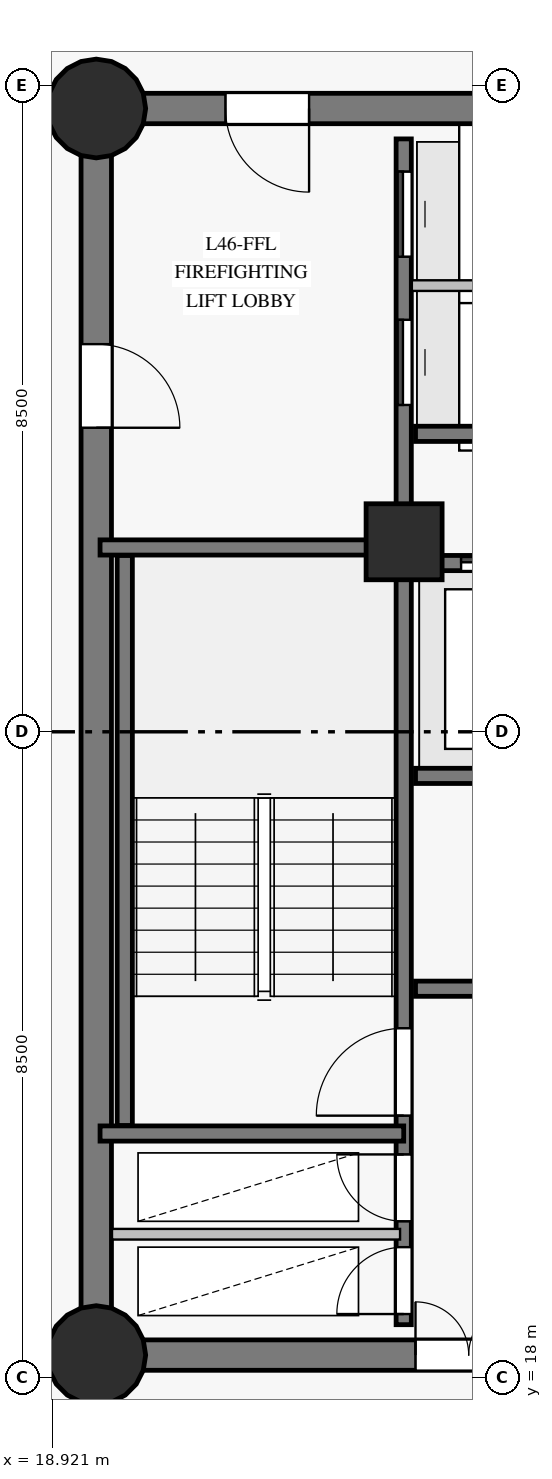
"""IFC4 building model, lengths in metres.
Left out: names, types, materials, properties, quantities, classifications, styles, units other than length and angle.
Written with IfcOpenShell. Run it as: python <this file> out.ifc"""

import sys

from ifc_helpers import new_model, si_unit, direction, frame, frame_2d, origin, origin_with_axes, origin_2d, place, context, subcontext, project, spatial, rectangle, circle, extrude, source, transform, mapped, element, fill, save


model = new_model("IFC4")
c1 = context("Model", 3, precision=1e-05, world=origin(), true_north=direction((0.0, 1.0)))
c2 = subcontext(c1, "Body", "Model", "MODEL_VIEW")
j1 = project(units=[si_unit("LENGTHUNIT", "METRE"), si_unit("PLANEANGLEUNIT", "RADIAN")], contexts=[c1])
p1 = place(None, origin())
s1 = spatial("IfcSite", under=j1, at=p1, CompositionType="ELEMENT")
p2 = place(p1, origin())
s2 = spatial("IfcBuilding", under=s1, at=p2, CompositionType="ELEMENT")
p3 = place(p2, frame((0.0, 0.0, 162.65)))
s3 = spatial("IfcBuildingStorey", under=s2, at=p3, CompositionType="ELEMENT", Elevation=162.65)
p4 = place(p3, frame((19.5, 18.3, 0.0), z_axis=(0.0, 0.0, 1.0), x_axis=(1.0, 0.0, 0.0)))
e1 = element("IfcWall", 1, at=p4, inside=s3, PredefinedType="SHEAR", context=c2, shape_type="SweptSolid", body=[
    extrude(rectangle(XDim=7.05, YDim=0.4, at=frame_2d((3.525, 0.0))), origin(), (0.0, 0.0, 1.0), 2.825),
])
p5 = place(p4, frame((4.2, 0.0, 0.0)))
e2 = element("IfcOpeningElement", 2, at=p5, cuts=e1, PredefinedType="OPENING", context=c2, shape_type="SweptSolid", body=[
    extrude(rectangle(XDim=1.4, YDim=2.2, at=frame_2d((0.7, 1.1))), frame((0.0, 0.21, 0.0), z_axis=(0.0, -1.0, 0.0), x_axis=(1.0, 0.0, 0.0)), (0.0, 0.0, 1.0), 0.42),
])
p6 = place(p3, frame((26.55, 34.7, 0.0), z_axis=(0.0, 0.0, 1.0), x_axis=(-1.0, 0.0, 0.0)))
e3 = element("IfcWall", 3, at=p6, inside=s3, PredefinedType="SHEAR", context=c2, shape_type="SweptSolid", body=[
    extrude(rectangle(XDim=7.05, YDim=0.4, at=frame_2d((3.525, 0.0))), origin(), (0.0, 0.0, 1.0), 2.825),
])
p7 = place(p6, frame((4.25, 0.0, 0.0)))
e4 = element("IfcOpeningElement", 4, at=p7, cuts=e3, PredefinedType="OPENING", context=c2, shape_type="SweptSolid", body=[
    extrude(rectangle(XDim=1.1, YDim=2.15, at=frame_2d((0.55, 1.075))), frame((0.0, 0.21, 0.0), z_axis=(0.0, -1.0, 0.0), x_axis=(1.0, 0.0, 0.0)), (0.0, 0.0, 1.0), 0.42),
])
p8 = place(p3, frame((19.5, 34.7, 0.0), z_axis=(0.0, 0.0, 1.0), x_axis=(0.0, -1.0, 0.0)))
e5 = element("IfcWall", 5, at=p8, inside=s3, PredefinedType="SHEAR", context=c2, shape_type="SweptSolid", body=[
    extrude(rectangle(XDim=16.4, YDim=0.4, at=frame_2d((8.2, 0.0))), origin(), (0.0, 0.0, 1.0), 2.825),
])
p9 = place(p8, frame((3.1, 0.0, 0.0)))
e6 = element("IfcOpeningElement", 6, at=p9, cuts=e5, PredefinedType="OPENING", context=c2, shape_type="SweptSolid", body=[
    extrude(rectangle(XDim=1.1, YDim=2.15, at=frame_2d((0.55, 1.075))), frame((0.0, 0.21, 0.0), z_axis=(0.0, -1.0, 0.0), x_axis=(1.0, 0.0, 0.0)), (0.0, 0.0, 1.0), 0.42),
])
m1 = source(origin_with_axes(), c2, "Body", "SweptSolid", [
    extrude(circle(Radius=0.65, at=origin_2d()), origin(), (0.0, 0.0, 1.0), 3.05),
])
for number, where, z_axis, x_axis in (
    (7, (19.5, 18.3, 0.0), (0.0, 0.0, 1.0), (1.0, 0.0, 0.0)),
    (8, (19.5, 34.7, 0.0), (0.0, 0.0, 1.0), (1.0, 0.0, 0.0)),
):
    element("IfcColumn", number, at=place(p3, frame(where, z_axis=z_axis, x_axis=x_axis)), inside=s3, PredefinedType="COLUMN", context=c2, shape_type="MappedRepresentation", body=[
        mapped(m1, transform((0.0, 0.0, 0.0), scale=1.0)),
    ])
m2 = source(origin_with_axes(), c2, "Body", "SweptSolid", [
    extrude(rectangle(XDim=1.0, YDim=1.0, at=origin_2d()), origin(), (0.0, 0.0, 1.0), 3.05),
])
p10 = place(p3, frame((23.55, 29.0, 0.0), z_axis=(0.0, 0.0, 1.0), x_axis=(1.0, 0.0, 0.0)))
e9 = element("IfcColumn", 9, at=p10, inside=s3, PredefinedType="COLUMN", context=c2, shape_type="MappedRepresentation", body=[
    mapped(m2, transform((0.0, 0.0, 0.0), scale=1.0)),
])
p11 = place(p3, frame((23.545, 18.7, 0.0), z_axis=(0.0, 0.0, 1.0), x_axis=(0.0, 1.0, 0.0)))
e10 = element("IfcWall", 10, at=p11, inside=s3, PredefinedType="SHEAR", context=c2, shape_type="SweptSolid", body=[
    extrude(rectangle(XDim=15.6, YDim=0.2, at=frame_2d((7.8, 0.0))), origin(), (0.0, 0.0, 1.0), 2.825),
])
p12 = place(p11, frame((2.75, 0.0, 0.0)))
e11 = element("IfcOpeningElement", 11, at=p12, cuts=e10, PredefinedType="OPENING", context=c2, shape_type="SweptSolid", body=[
    extrude(rectangle(XDim=1.15, YDim=2.15, at=frame_2d((0.575, 1.075))), frame((0.0, 0.11, 0.0), z_axis=(0.0, -1.0, 0.0), x_axis=(1.0, 0.0, 0.0)), (0.0, 0.0, 1.0), 0.22),
])
p13 = place(p11, frame((0.14, 0.0, 0.0)))
e12 = element("IfcOpeningElement", 12, at=p13, cuts=e10, PredefinedType="OPENING", context=c2, shape_type="SweptSolid", body=[
    extrude(rectangle(XDim=0.88, YDim=2.1, at=frame_2d((0.44, 1.05))), frame((0.0, 0.11, 0.0), z_axis=(0.0, -1.0, 0.0), x_axis=(1.0, 0.0, 0.0)), (0.0, 0.0, 1.0), 0.22),
])
p14 = place(p11, frame((1.36, 0.0, 0.0)))
e13 = element("IfcOpeningElement", 13, at=p14, cuts=e10, PredefinedType="OPENING", context=c2, shape_type="SweptSolid", body=[
    extrude(rectangle(XDim=0.88, YDim=2.1, at=frame_2d((0.44, 1.05))), frame((0.0, 0.11, 0.0), z_axis=(0.0, -1.0, 0.0), x_axis=(1.0, 0.0, 0.0)), (0.0, 0.0, 1.0), 0.22),
])
p15 = place(p11, frame((12.1, 0.0, 0.0)))
e14 = element("IfcOpeningElement", 14, at=p15, cuts=e10, PredefinedType="OPENING", context=c2, shape_type="SweptSolid", body=[
    extrude(rectangle(XDim=1.12, YDim=2.15, at=frame_2d((0.56, 1.075))), frame((0.0, 0.11, 0.0), z_axis=(0.0, -1.0, 0.0), x_axis=(1.0, 0.0, 0.0)), (0.0, 0.0, 1.0), 0.22),
])
p16 = place(p11, frame((14.05, 0.0, 0.0)))
e15 = element("IfcOpeningElement", 15, at=p16, cuts=e10, PredefinedType="OPENING", context=c2, shape_type="SweptSolid", body=[
    extrude(rectangle(XDim=1.12, YDim=2.15, at=frame_2d((0.56, 1.075))), frame((0.0, 0.11, 0.0), z_axis=(0.0, -1.0, 0.0), x_axis=(1.0, 0.0, 0.0)), (0.0, 0.0, 1.0), 0.22),
])
p17 = place(p3, frame((23.7, 23.12, 0.0), z_axis=(0.0, 0.0, 1.0), x_axis=(1.0, 0.0, 0.0)))
e16 = element("IfcWall", 16, at=p17, inside=s3, PredefinedType="SHEAR", context=c2, shape_type="SweptSolid", body=[
    extrude(rectangle(XDim=9.6, YDim=0.2, at=frame_2d((4.8, 0.0))), origin(), (0.0, 0.0, 1.0), 2.825),
])
p18 = place(p17, frame((4.2, 0.0, 0.0)))
e17 = element("IfcOpeningElement", 17, at=p18, cuts=e16, PredefinedType="OPENING", context=c2, shape_type="SweptSolid", body=[
    extrude(rectangle(XDim=1.0, YDim=2.15, at=frame_2d((0.5, 1.075))), frame((0.0, 0.11, 0.0), z_axis=(0.0, -1.0, 0.0), x_axis=(1.0, 0.0, 0.0)), (0.0, 0.0, 1.0), 0.22),
])
p19 = place(p3, frame((23.7, 25.92, 0.0), z_axis=(0.0, 0.0, 1.0), x_axis=(1.0, 0.0, 0.0)))
e18 = element("IfcWall", 18, at=p19, inside=s3, PredefinedType="SHEAR", context=c2, shape_type="SweptSolid", body=[
    extrude(rectangle(XDim=9.6, YDim=0.2, at=frame_2d((4.8, 0.0))), origin(), (0.0, 0.0, 1.0), 2.825),
])
p20 = place(p3, frame((23.7, 28.72, 0.0), z_axis=(0.0, 0.0, 1.0), x_axis=(1.0, 0.0, 0.0)))
e19 = element("IfcWall", 19, at=p20, inside=s3, PredefinedType="SHEAR", context=c2, shape_type="SweptSolid", body=[
    extrude(rectangle(XDim=9.6, YDim=0.2, at=frame_2d((4.8, 0.0))), origin(), (0.0, 0.0, 1.0), 2.825),
])
p21 = place(p20, frame((0.6, 0.0, 0.0)))
e20 = element("IfcOpeningElement", 20, at=p21, cuts=e19, PredefinedType="OPENING", context=c2, shape_type="SweptSolid", body=[
    extrude(rectangle(XDim=1.1, YDim=2.15, at=frame_2d((0.55, 1.075))), frame((0.0, 0.11, 0.0), z_axis=(0.0, -1.0, 0.0), x_axis=(1.0, 0.0, 0.0)), (0.0, 0.0, 1.0), 0.22),
])
p22 = place(p20, frame((2.98, 0.0, 0.0)))
e21 = element("IfcOpeningElement", 21, at=p22, cuts=e19, PredefinedType="OPENING", context=c2, shape_type="SweptSolid", body=[
    extrude(rectangle(XDim=1.1, YDim=2.15, at=frame_2d((0.55, 1.075))), frame((0.0, 0.11, 0.0), z_axis=(0.0, -1.0, 0.0), x_axis=(1.0, 0.0, 0.0)), (0.0, 0.0, 1.0), 0.22),
])
p23 = place(p20, frame((5.36, 0.0, 0.0)))
e22 = element("IfcOpeningElement", 22, at=p23, cuts=e19, PredefinedType="OPENING", context=c2, shape_type="SweptSolid", body=[
    extrude(rectangle(XDim=1.1, YDim=2.15, at=frame_2d((0.55, 1.075))), frame((0.0, 0.11, 0.0), z_axis=(0.0, -1.0, 0.0), x_axis=(1.0, 0.0, 0.0)), (0.0, 0.0, 1.0), 0.22),
])
p24 = place(p20, frame((7.74, 0.0, 0.0)))
e23 = element("IfcOpeningElement", 23, at=p24, cuts=e19, PredefinedType="OPENING", context=c2, shape_type="SweptSolid", body=[
    extrude(rectangle(XDim=1.1, YDim=2.15, at=frame_2d((0.55, 1.075))), frame((0.0, 0.11, 0.0), z_axis=(0.0, -1.0, 0.0), x_axis=(1.0, 0.0, 0.0)), (0.0, 0.0, 1.0), 0.22),
])
p25 = place(p3, frame((19.875, 21.32, 0.0), z_axis=(0.0, 0.0, 1.0), x_axis=(0.0, 1.0, 0.0)))
e24 = element("IfcWall", 24, at=p25, inside=s3, PredefinedType="SHEAR", context=c2, shape_type="SweptSolid", body=[
    extrude(rectangle(XDim=7.5, YDim=0.2, at=frame_2d((3.75, 0.0))), origin(), (0.0, 0.0, 1.0), 2.825),
])
for number, where, z_axis, x_axis in (
    (25, (19.55, 21.215, 0.0), (0.0, 0.0, 1.0), (1.0, 0.0, 0.0)),
    (26, (19.55, 28.925, 0.0), (0.0, 0.0, 1.0), (1.0, 0.0, 0.0)),
):
    element("IfcWall", number, at=place(p3, frame(where, z_axis=z_axis, x_axis=x_axis)), inside=s3, PredefinedType="SHEAR", context=c2, shape_type="SweptSolid", body=[
        extrude(rectangle(XDim=3.995, YDim=0.2, at=frame_2d((1.998, 0.0))), origin(), (0.0, 0.0, 1.0), 2.825),
    ])
p26 = place(p3, frame((23.7, 30.42, 0.0), z_axis=(0.0, 0.0, 1.0), x_axis=(1.0, 0.0, 0.0)))
e27 = element("IfcWall", 27, at=p26, inside=s3, PredefinedType="SHEAR", context=c2, shape_type="SweptSolid", body=[
    extrude(rectangle(XDim=2.78, YDim=0.2, at=frame_2d((1.39, 0.0))), origin(), (0.0, 0.0, 1.0), 2.825),
])
p27 = place(p3, frame((19.707, 19.89, 0.0), z_axis=(0.0, 0.0, 1.0), x_axis=(1.0, 0.0, 0.0)))
e28 = element("IfcWall", 28, at=p27, inside=s3, PredefinedType="PARTITIONING", context=c2, shape_type="SweptSolid", body=[
    extrude(rectangle(XDim=3.79, YDim=0.14, at=frame_2d((1.895, 0.0))), origin(), (0.0, 0.0, 1.0), 2.825),
])
p28 = place(p3, frame((23.652, 32.37, 0.0), z_axis=(0.0, 0.0, 1.0), x_axis=(1.0, 0.0, 0.0)))
e29 = element("IfcWall", 29, at=p28, inside=s3, PredefinedType="PARTITIONING", context=c2, shape_type="SweptSolid", body=[
    extrude(rectangle(XDim=2.828, YDim=0.14, at=frame_2d((1.414, 0.0))), origin(), (0.0, 0.0, 1.0), 2.825),
])
m3 = source(origin_with_axes(), c2, "Body", "SweptSolid", [
    extrude(rectangle(XDim=1.15, YDim=2.15, at=frame_2d((0.575, 1.075))), frame((0.0, 0.025, 0.0), z_axis=(0.0, -1.0, 0.0), x_axis=(1.0, 0.0, 0.0)), (0.0, 0.0, 1.0), 0.05),
])
p29 = place(p12, origin())
e30 = element("IfcDoor", 30, at=p29, inside=s3, OperationType="SINGLE_SWING_LEFT", PredefinedType="DOOR", context=c2, shape_type="MappedRepresentation", body=[
    mapped(m3, transform((0.0, 0.0, 0.0), scale=1.0)),
])
fill(e11, e30)
m4 = source(origin_with_axes(), c2, "Body", "SweptSolid", [
    extrude(rectangle(XDim=1.1, YDim=2.15, at=frame_2d((0.55, 1.075))), frame((0.0, 0.025, 0.0), z_axis=(0.0, -1.0, 0.0), x_axis=(1.0, 0.0, 0.0)), (0.0, 0.0, 1.0), 0.05),
])
p30 = place(p7, origin())
e31 = element("IfcDoor", 31, at=p30, inside=s3, OperationType="SINGLE_SWING_LEFT", PredefinedType="DOOR", context=c2, shape_type="MappedRepresentation", body=[
    mapped(m4, transform((0.0, 0.0, 0.0), scale=1.0)),
])
fill(e4, e31)
p31 = place(p9, origin())
e32 = element("IfcDoor", 32, at=p31, inside=s3, OperationType="SINGLE_SWING_RIGHT", PredefinedType="DOOR", context=c2, shape_type="MappedRepresentation", body=[
    mapped(m4, transform((0.0, 0.0, 0.0), scale=1.0)),
])
fill(e6, e32)
m5 = source(origin_with_axes(), c2, "Body", "SweptSolid", [
    extrude(rectangle(XDim=0.88, YDim=2.1, at=frame_2d((0.44, 1.05))), frame((0.0, 0.025, 0.0), z_axis=(0.0, -1.0, 0.0), x_axis=(1.0, 0.0, 0.0)), (0.0, 0.0, 1.0), 0.05),
])
p32 = place(p13, origin())
e33 = element("IfcDoor", 33, at=p32, inside=s3, OperationType="SINGLE_SWING_LEFT", PredefinedType="DOOR", context=c2, shape_type="MappedRepresentation", body=[
    mapped(m5, transform((0.0, 0.0, 0.0), scale=1.0)),
])
fill(e12, e33)
p33 = place(p14, origin())
e34 = element("IfcDoor", 34, at=p33, inside=s3, OperationType="SINGLE_SWING_RIGHT", PredefinedType="DOOR", context=c2, shape_type="MappedRepresentation", body=[
    mapped(m5, transform((0.0, 0.0, 0.0), scale=1.0)),
])
fill(e13, e34)
m6 = source(origin_with_axes(), c2, "Body", "SweptSolid", [
    extrude(rectangle(XDim=1.4, YDim=2.2, at=frame_2d((0.7, 1.1))), frame((0.0, 0.025, 0.0), z_axis=(0.0, -1.0, 0.0), x_axis=(1.0, 0.0, 0.0)), (0.0, 0.0, 1.0), 0.05),
])
p34 = place(p5, origin())
e35 = element("IfcDoor", 35, at=p34, inside=s3, OperationType="DOUBLE_DOOR_SINGLE_SWING", PredefinedType="DOOR", context=c2, shape_type="MappedRepresentation", body=[
    mapped(m6, transform((0.0, 0.0, 0.0), scale=1.0)),
])
fill(e2, e35)
p35 = place(p21, origin())
e36 = element("IfcDoor", 36, at=p35, inside=s3, OperationType="SLIDING_TO_LEFT", PredefinedType="DOOR", context=c2, shape_type="MappedRepresentation", body=[
    mapped(m4, transform((0.0, 0.0, 0.0), scale=1.0)),
])
fill(e20, e36)
m7 = source(origin_with_axes(), c2, "Body", "SweptSolid", [
    extrude(rectangle(XDim=1.12, YDim=2.15, at=frame_2d((0.56, 1.075))), frame((0.0, 0.025, 0.0), z_axis=(0.0, -1.0, 0.0), x_axis=(1.0, 0.0, 0.0)), (0.0, 0.0, 1.0), 0.05),
])
p36 = place(p15, origin())
e37 = element("IfcDoor", 37, at=p36, inside=s3, OperationType="SLIDING_TO_LEFT", PredefinedType="DOOR", context=c2, shape_type="MappedRepresentation", body=[
    mapped(m7, transform((0.0, 0.0, 0.0), scale=1.0)),
])
fill(e14, e37)
p37 = place(p16, origin())
e38 = element("IfcDoor", 38, at=p37, inside=s3, OperationType="SLIDING_TO_RIGHT", PredefinedType="DOOR", context=c2, shape_type="MappedRepresentation", body=[
    mapped(m7, transform((0.0, 0.0, 0.0), scale=1.0)),
])
fill(e15, e38)
save(model, sys.argv[1])
